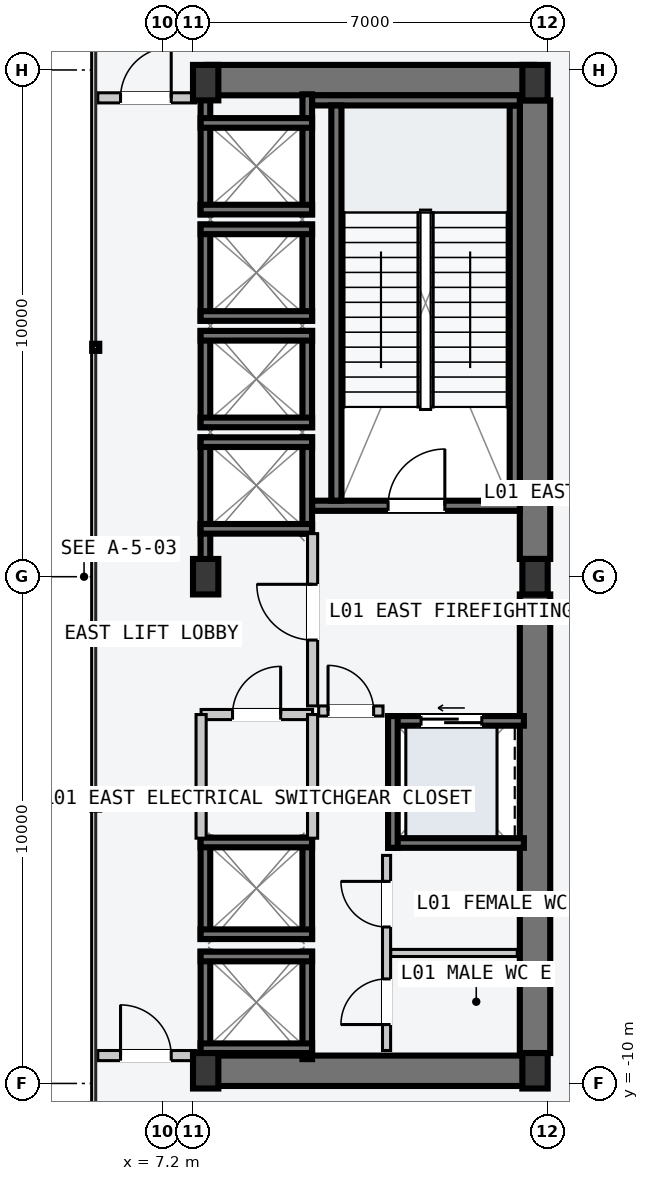
"""IFC4 building model, lengths in metres.
Left out: names, types, materials, properties, quantities, classifications, styles, units other than length and angle.
Written with IfcOpenShell. Run it as: python <this file> out.ifc"""

import sys

from ifc_helpers import new_model, si_unit, direction, frame, frame_2d, origin, origin_2d, place, context, subcontext, project, spatial, rectangle, i_section, extrude, element, fill, save


model = new_model("IFC4")
c1 = context("Model", 3, precision=1e-05, world=origin(), true_north=direction((0.0, 1.0)))
c2 = subcontext(c1, "Body", "Model", "MODEL_VIEW")
j1 = project(units=[si_unit("LENGTHUNIT", "METRE"), si_unit("PLANEANGLEUNIT", "RADIAN")], contexts=[c1])
p1 = place(None, origin())
s1 = spatial("IfcSite", under=j1, at=p1, CompositionType="ELEMENT")
p2 = place(p1, origin())
s2 = spatial("IfcBuilding", under=s1, at=p2, CompositionType="ELEMENT")
p3 = place(p2, frame((0.0, 0.0, 4.8)))
s3 = spatial("IfcBuildingStorey", under=s2, at=p3, CompositionType="ELEMENT", Elevation=4.8)
for number, where, z_axis, x_axis in (
    (1, (8.07, -9.75, -0.22), (0.0, 0.0, 1.0), (1.0, 0.0, 0.0)),
    (2, (8.07, 9.8, -0.22), (0.0, 0.0, 1.0), (1.0, 0.0, 0.0)),
):
    element("IfcWall", number, at=place(p3, frame(where, z_axis=z_axis, x_axis=x_axis)), inside=s3, PredefinedType="SHEAR", context=c2, shape_type="SweptSolid", body=[
        extrude(rectangle(XDim=6.46, YDim=0.6, at=frame_2d((3.23, 0.0))), origin(), (0.0, 0.0, 1.0), 4.8),
    ])
for number, where, z_axis, x_axis in (
    (3, (14.55, -9.4, -0.22), (0.0, 0.0, 1.0), (0.0, 1.0, 0.0)),
    (4, (14.55, 0.35, -0.22), (0.0, 0.0, 1.0), (0.0, 1.0, 0.0)),
):
    element("IfcWall", number, at=place(p3, frame(where, z_axis=z_axis, x_axis=x_axis)), inside=s3, PredefinedType="SHEAR", context=c2, shape_type="SweptSolid", body=[
        extrude(rectangle(XDim=9.05, YDim=0.6, at=frame_2d((4.525, 0.0))), origin(), (0.0, 0.0, 1.0), 4.8),
    ])
p4 = place(p3, frame((14.15, 1.5, -0.22), z_axis=(0.0, 0.0, 1.0), x_axis=(0.0, 1.0, 0.0)))
e5 = element("IfcWall", 5, at=p4, inside=s3, PredefinedType="SOLIDWALL", context=c2, shape_type="SweptSolid", body=[
    extrude(rectangle(XDim=7.8, YDim=0.2, at=frame_2d((3.9, 0.0))), origin(), (0.0, 0.0, 1.0), 4.8),
])
p5 = place(p3, frame((10.15, 1.4, -0.22), z_axis=(0.0, 0.0, 1.0), x_axis=(1.0, 0.0, 0.0)))
e6 = element("IfcWall", 6, at=p5, inside=s3, PredefinedType="SOLIDWALL", context=c2, shape_type="SweptSolid", body=[
    extrude(rectangle(XDim=4.1, YDim=0.2, at=frame_2d((2.05, 0.0))), origin(), (0.0, 0.0, 1.0), 4.8),
])
p6 = place(p5, frame((1.5, 0.0, 0.22)))
e7 = element("IfcOpeningElement", 7, at=p6, cuts=e6, PredefinedType="OPENING", context=c2, shape_type="SweptSolid", body=[
    extrude(rectangle(XDim=1.12, YDim=2.18, at=frame_2d((0.56, 1.09))), frame((0.0, 0.11, 0.0), z_axis=(0.0, -1.0, 0.0), x_axis=(1.0, 0.0, 0.0)), (0.0, 0.0, 1.0), 0.22),
])
p7 = place(p3, frame((10.15, 9.4, -0.22), z_axis=(0.0, 0.0, 1.0), x_axis=(1.0, 0.0, 0.0)))
e8 = element("IfcWall", 8, at=p7, inside=s3, PredefinedType="SOLIDWALL", context=c2, shape_type="SweptSolid", body=[
    extrude(rectangle(XDim=4.1, YDim=0.2, at=frame_2d((2.05, 0.0))), origin(), (0.0, 0.0, 1.0), 4.8),
])
p8 = place(p3, frame((10.63, 1.5, -0.22), z_axis=(0.0, 0.0, 1.0), x_axis=(0.0, 1.0, 0.0)))
e9 = element("IfcWall", 9, at=p8, inside=s3, PredefinedType="SOLIDWALL", context=c2, shape_type="SweptSolid", body=[
    extrude(rectangle(XDim=7.8, YDim=0.2, at=frame_2d((3.9, 0.0))), origin(), (0.0, 0.0, 1.0), 4.8),
])
for number, where, z_axis, x_axis in (
    (10, (8.05, -9.75, 0.0), (0.0, 0.0, 1.0), (1.0, 0.0, 0.0)),
    (11, (8.05, 0.0, 0.0), (0.0, 0.0, 1.0), (1.0, 0.0, 0.0)),
    (12, (8.05, 9.75, 0.0), (0.0, 0.0, 1.0), (1.0, 0.0, 0.0)),
    (13, (14.55, -9.75, 0.0), (0.0, 0.0, 1.0), (1.0, 0.0, 0.0)),
    (14, (14.55, 0.0, 0.0), (0.0, 0.0, 1.0), (1.0, 0.0, 0.0)),
    (15, (14.55, 9.75, 0.0), (0.0, 0.0, 1.0), (1.0, 0.0, 0.0)),
):
    element("IfcColumn", number, at=place(p3, frame(where, z_axis=z_axis, x_axis=x_axis)), inside=s3, PredefinedType="COLUMN", context=c2, shape_type="SweptSolid", body=[
        extrude(i_section(OverallWidth=0.5, OverallDepth=0.7, WebThickness=0.028, FlangeThickness=0.045, at=origin_2d()), origin(), (0.0, 0.0, 1.0), 4.8),
    ])
p9 = place(p3, frame((8.045, 0.21, -0.22), z_axis=(0.0, 0.0, 1.0), x_axis=(0.0, 1.0, 0.0)))
e16 = element("IfcWall", 16, at=p9, inside=s3, PredefinedType="SOLIDWALL", context=c2, shape_type="SweptSolid", body=[
    extrude(rectangle(XDim=2.54, YDim=0.19, at=frame_2d((1.27, 0.0))), origin(), (0.0, 0.0, 1.0), 4.8),
])
p10 = place(p3, frame((10.055, 0.85, -0.22), z_axis=(0.0, 0.0, 1.0), x_axis=(0.0, 1.0, 0.0)))
e17 = element("IfcWall", 17, at=p10, inside=s3, PredefinedType="SOLIDWALL", context=c2, shape_type="SweptSolid", body=[
    extrude(rectangle(XDim=1.9, YDim=0.19, at=frame_2d((0.95, 0.0))), origin(), (0.0, 0.0, 1.0), 4.8),
])
for number, where, z_axis, x_axis in (
    (18, (7.95, 2.655, -0.22), (0.0, 0.0, 1.0), (1.0, 0.0, 0.0)),
    (19, (7.95, 0.945, -0.22), (0.0, 0.0, 1.0), (1.0, 0.0, 0.0)),
):
    element("IfcWall", number, at=place(p3, frame(where, z_axis=z_axis, x_axis=x_axis)), inside=s3, PredefinedType="SOLIDWALL", context=c2, shape_type="SweptSolid", body=[
        extrude(rectangle(XDim=2.2, YDim=0.19, at=frame_2d((1.1, 0.0))), origin(), (0.0, 0.0, 1.0), 4.8),
    ])
for number, where, z_axis, x_axis in (
    (20, (8.045, 2.95, -0.22), (0.0, 0.0, 1.0), (0.0, 1.0, 0.0)),
    (21, (10.055, 2.95, -0.22), (0.0, 0.0, 1.0), (0.0, 1.0, 0.0)),
):
    element("IfcWall", number, at=place(p3, frame(where, z_axis=z_axis, x_axis=x_axis)), inside=s3, PredefinedType="SOLIDWALL", context=c2, shape_type="SweptSolid", body=[
        extrude(rectangle(XDim=1.9, YDim=0.19, at=frame_2d((0.95, 0.0))), origin(), (0.0, 0.0, 1.0), 4.8),
    ])
for number, where, z_axis, x_axis in (
    (22, (7.95, 4.755, -0.22), (0.0, 0.0, 1.0), (1.0, 0.0, 0.0)),
    (23, (7.95, 3.045, -0.22), (0.0, 0.0, 1.0), (1.0, 0.0, 0.0)),
):
    element("IfcWall", number, at=place(p3, frame(where, z_axis=z_axis, x_axis=x_axis)), inside=s3, PredefinedType="SOLIDWALL", context=c2, shape_type="SweptSolid", body=[
        extrude(rectangle(XDim=2.2, YDim=0.19, at=frame_2d((1.1, 0.0))), origin(), (0.0, 0.0, 1.0), 4.8),
    ])
for number, where, z_axis, x_axis in (
    (24, (8.045, 5.05, -0.22), (0.0, 0.0, 1.0), (0.0, 1.0, 0.0)),
    (25, (10.055, 5.05, -0.22), (0.0, 0.0, 1.0), (0.0, 1.0, 0.0)),
):
    element("IfcWall", number, at=place(p3, frame(where, z_axis=z_axis, x_axis=x_axis)), inside=s3, PredefinedType="SOLIDWALL", context=c2, shape_type="SweptSolid", body=[
        extrude(rectangle(XDim=1.9, YDim=0.19, at=frame_2d((0.95, 0.0))), origin(), (0.0, 0.0, 1.0), 4.8),
    ])
for number, where, z_axis, x_axis in (
    (26, (7.95, 6.855, -0.22), (0.0, 0.0, 1.0), (1.0, 0.0, 0.0)),
    (27, (7.95, 5.145, -0.22), (0.0, 0.0, 1.0), (1.0, 0.0, 0.0)),
):
    element("IfcWall", number, at=place(p3, frame(where, z_axis=z_axis, x_axis=x_axis)), inside=s3, PredefinedType="SOLIDWALL", context=c2, shape_type="SweptSolid", body=[
        extrude(rectangle(XDim=2.2, YDim=0.19, at=frame_2d((1.1, 0.0))), origin(), (0.0, 0.0, 1.0), 4.8),
    ])
for number, where, z_axis, x_axis in (
    (28, (8.045, 7.15, -0.22), (0.0, 0.0, 1.0), (0.0, 1.0, 0.0)),
    (29, (10.055, 7.15, -0.22), (0.0, 0.0, 1.0), (0.0, 1.0, 0.0)),
):
    element("IfcWall", number, at=place(p3, frame(where, z_axis=z_axis, x_axis=x_axis)), inside=s3, PredefinedType="SOLIDWALL", context=c2, shape_type="SweptSolid", body=[
        extrude(rectangle(XDim=2.37, YDim=0.19, at=frame_2d((1.185, 0.0))), origin(), (0.0, 0.0, 1.0), 4.8),
    ])
for number, where, z_axis, x_axis in (
    (30, (7.95, 8.955, -0.22), (0.0, 0.0, 1.0), (1.0, 0.0, 0.0)),
    (31, (7.95, 7.245, -0.22), (0.0, 0.0, 1.0), (1.0, 0.0, 0.0)),
):
    element("IfcWall", number, at=place(p3, frame(where, z_axis=z_axis, x_axis=x_axis)), inside=s3, PredefinedType="SOLIDWALL", context=c2, shape_type="SweptSolid", body=[
        extrude(rectangle(XDim=2.2, YDim=0.19, at=frame_2d((1.1, 0.0))), origin(), (0.0, 0.0, 1.0), 4.8),
    ])
for number, where, z_axis, x_axis in (
    (32, (8.045, -9.52, -0.22), (0.0, 0.0, 1.0), (0.0, 1.0, 0.0)),
    (33, (10.055, -9.52, -0.22), (0.0, 0.0, 1.0), (0.0, 1.0, 0.0)),
):
    element("IfcWall", number, at=place(p3, frame(where, z_axis=z_axis, x_axis=x_axis)), inside=s3, PredefinedType="SOLIDWALL", context=c2, shape_type="SweptSolid", body=[
        extrude(rectangle(XDim=2.12, YDim=0.19, at=frame_2d((1.06, 0.0))), origin(), (0.0, 0.0, 1.0), 4.8),
    ])
for number, where, z_axis, x_axis in (
    (34, (7.95, -7.495, -0.22), (0.0, 0.0, 1.0), (1.0, 0.0, 0.0)),
    (35, (7.95, -9.305, -0.22), (0.0, 0.0, 1.0), (1.0, 0.0, 0.0)),
):
    element("IfcWall", number, at=place(p3, frame(where, z_axis=z_axis, x_axis=x_axis)), inside=s3, PredefinedType="SOLIDWALL", context=c2, shape_type="SweptSolid", body=[
        extrude(rectangle(XDim=2.2, YDim=0.19, at=frame_2d((1.1, 0.0))), origin(), (0.0, 0.0, 1.0), 4.8),
    ])
for number, where, z_axis, x_axis in (
    (36, (8.045, -7.15, -0.22), (0.0, 0.0, 1.0), (0.0, 1.0, 0.0)),
    (37, (10.055, -7.15, -0.22), (0.0, 0.0, 1.0), (0.0, 1.0, 0.0)),
):
    element("IfcWall", number, at=place(p3, frame(where, z_axis=z_axis, x_axis=x_axis)), inside=s3, PredefinedType="SOLIDWALL", context=c2, shape_type="SweptSolid", body=[
        extrude(rectangle(XDim=2.0, YDim=0.19, at=frame_2d((1.0, 0.0))), origin(), (0.0, 0.0, 1.0), 4.8),
    ])
for number, where, z_axis, x_axis in (
    (38, (7.95, -5.245, -0.22), (0.0, 0.0, 1.0), (1.0, 0.0, 0.0)),
    (39, (7.95, -7.055, -0.22), (0.0, 0.0, 1.0), (1.0, 0.0, 0.0)),
):
    element("IfcWall", number, at=place(p3, frame(where, z_axis=z_axis, x_axis=x_axis)), inside=s3, PredefinedType="SOLIDWALL", context=c2, shape_type="SweptSolid", body=[
        extrude(rectangle(XDim=2.2, YDim=0.19, at=frame_2d((1.1, 0.0))), origin(), (0.0, 0.0, 1.0), 4.8),
    ])
p11 = place(p3, frame((11.65, -2.845, -0.22), z_axis=(0.0, 0.0, 1.0), x_axis=(1.0, 0.0, 0.0)))
e40 = element("IfcWall", 40, at=p11, inside=s3, PredefinedType="SOLIDWALL", context=c2, shape_type="SweptSolid", body=[
    extrude(rectangle(XDim=2.68, YDim=0.19, at=frame_2d((1.34, 0.0))), origin(), (0.0, 0.0, 1.0), 4.8),
])
p12 = place(p11, frame((0.65, 0.0, 0.22)))
e41 = element("IfcOpeningElement", 41, at=p12, cuts=e40, PredefinedType="OPENING", context=c2, shape_type="SweptSolid", body=[
    extrude(rectangle(XDim=1.2, YDim=2.2, at=frame_2d((0.6, 1.1))), frame((0.0, 0.105, 0.0), z_axis=(0.0, -1.0, 0.0), x_axis=(1.0, 0.0, 0.0)), (0.0, 0.0, 1.0), 0.21),
])
p13 = place(p3, frame((11.65, -5.255, -0.22), z_axis=(0.0, 0.0, 1.0), x_axis=(1.0, 0.0, 0.0)))
e42 = element("IfcWall", 42, at=p13, inside=s3, PredefinedType="SOLIDWALL", context=c2, shape_type="SweptSolid", body=[
    extrude(rectangle(XDim=2.68, YDim=0.19, at=frame_2d((1.34, 0.0))), origin(), (0.0, 0.0, 1.0), 4.8),
])
p14 = place(p3, frame((11.745, -5.35, -0.22), z_axis=(0.0, 0.0, 1.0), x_axis=(0.0, 1.0, 0.0)))
e43 = element("IfcWall", 43, at=p14, inside=s3, PredefinedType="SOLIDWALL", context=c2, shape_type="SweptSolid", body=[
    extrude(rectangle(XDim=2.6, YDim=0.19, at=frame_2d((1.3, 0.0))), origin(), (0.0, 0.0, 1.0), 4.8),
])
p15 = place(p3, frame((10.16, -2.55, 0.0), z_axis=(0.0, 0.0, 1.0), x_axis=(0.0, 1.0, 0.0)))
e44 = element("IfcWall", 44, at=p15, inside=s3, PredefinedType="PARTITIONING", context=c2, shape_type="SweptSolid", body=[
    extrude(rectangle(XDim=3.4, YDim=0.2, at=frame_2d((1.7, 0.0))), origin(), (0.0, 0.0, 1.0), 4.58),
])
p16 = place(p15, frame((1.3, 0.0, 0.0)))
e45 = element("IfcOpeningElement", 45, at=p16, cuts=e44, PredefinedType="OPENING", context=c2, shape_type="SweptSolid", body=[
    extrude(rectangle(XDim=1.1, YDim=2.15, at=frame_2d((0.55, 1.075))), frame((0.0, 0.11, 0.0), z_axis=(0.0, -1.0, 0.0), x_axis=(1.0, 0.0, 0.0)), (0.0, 0.0, 1.0), 0.22),
])
p17 = place(p3, frame((10.28, -2.65, 0.0), z_axis=(0.0, 0.0, 1.0), x_axis=(1.0, 0.0, 0.0)))
e46 = element("IfcWall", 46, at=p17, inside=s3, PredefinedType="PARTITIONING", context=c2, shape_type="SweptSolid", body=[
    extrude(rectangle(XDim=1.27, YDim=0.2, at=frame_2d((0.635, 0.0))), origin(), (0.0, 0.0, 1.0), 4.58),
])
p18 = place(p17, frame((0.185, 0.0, 0.0)))
e47 = element("IfcOpeningElement", 47, at=p18, cuts=e46, PredefinedType="OPENING", context=c2, shape_type="SweptSolid", body=[
    extrude(rectangle(XDim=0.9, YDim=2.15, at=frame_2d((0.45, 1.075))), frame((0.0, 0.11, 0.0), z_axis=(0.0, -1.0, 0.0), x_axis=(1.0, 0.0, 0.0)), (0.0, 0.0, 1.0), 0.22),
])
p19 = place(p3, frame((7.96, -2.72, 0.0), z_axis=(0.0, 0.0, 1.0), x_axis=(1.0, 0.0, 0.0)))
e48 = element("IfcWall", 48, at=p19, inside=s3, PredefinedType="PARTITIONING", context=c2, shape_type="SweptSolid", body=[
    extrude(rectangle(XDim=2.2, YDim=0.2, at=frame_2d((1.1, 0.0))), origin(), (0.0, 0.0, 1.0), 4.58),
])
p20 = place(p19, frame((0.62, 0.0, 0.0)))
e49 = element("IfcOpeningElement", 49, at=p20, cuts=e48, PredefinedType="OPENING", context=c2, shape_type="SweptSolid", body=[
    extrude(rectangle(XDim=0.95, YDim=2.1, at=frame_2d((0.475, 1.05))), frame((0.0, 0.11, 0.0), z_axis=(0.0, -1.0, 0.0), x_axis=(1.0, 0.0, 0.0)), (0.0, 0.0, 1.0), 0.22),
])
for number, where, z_axis, x_axis in (
    (50, (7.96, -5.16, 0.0), (0.0, 0.0, 1.0), (0.0, 1.0, 0.0)),
    (51, (10.16, -5.16, 0.0), (0.0, 0.0, 1.0), (0.0, 1.0, 0.0)),
):
    element("IfcWall", number, at=place(p3, frame(where, z_axis=z_axis, x_axis=x_axis)), inside=s3, PredefinedType="PARTITIONING", context=c2, shape_type="SweptSolid", body=[
        extrude(rectangle(XDim=2.44, YDim=0.2, at=frame_2d((1.22, 0.0))), origin(), (0.0, 0.0, 1.0), 4.58),
    ])
p21 = place(p3, frame((11.7, -7.425, 0.0), z_axis=(0.0, 0.0, 1.0), x_axis=(1.0, 0.0, 0.0)))
e52 = element("IfcWall", 52, at=p21, inside=s3, PredefinedType="PARTITIONING", context=c2, shape_type="SweptSolid", body=[
    extrude(rectangle(XDim=2.5, YDim=0.14, at=frame_2d((1.25, 0.0))), origin(), (0.0, 0.0, 1.0), 4.58),
])
p22 = place(p3, frame((11.62, -9.35, 0.0), z_axis=(0.0, 0.0, 1.0), x_axis=(0.0, 1.0, 0.0)))
e53 = element("IfcWall", 53, at=p22, inside=s3, PredefinedType="PARTITIONING", context=c2, shape_type="SweptSolid", body=[
    extrude(rectangle(XDim=3.85, YDim=0.16, at=frame_2d((1.925, 0.0))), origin(), (0.0, 0.0, 1.0), 4.58),
])
p23 = place(p22, frame((0.512, 0.0, 0.0)))
e54 = element("IfcOpeningElement", 54, at=p23, cuts=e53, PredefinedType="OPENING", context=c2, shape_type="SweptSolid", body=[
    extrude(rectangle(XDim=0.9, YDim=2.15, at=frame_2d((0.45, 1.075))), frame((0.0, 0.09, 0.0), z_axis=(0.0, -1.0, 0.0), x_axis=(1.0, 0.0, 0.0)), (0.0, 0.0, 1.0), 0.18),
])
p24 = place(p22, frame((2.438, 0.0, 0.0)))
e55 = element("IfcOpeningElement", 55, at=p24, cuts=e53, PredefinedType="OPENING", context=c2, shape_type="SweptSolid", body=[
    extrude(rectangle(XDim=0.9, YDim=2.15, at=frame_2d((0.45, 1.075))), frame((0.0, 0.09, 0.0), z_axis=(0.0, -1.0, 0.0), x_axis=(1.0, 0.0, 0.0)), (0.0, 0.0, 1.0), 0.18),
])
p25 = place(p3, frame((5.92, -9.45, 0.0), z_axis=(0.0, 0.0, 1.0), x_axis=(1.0, 0.0, 0.0)))
e56 = element("IfcWall", 56, at=p25, inside=s3, PredefinedType="PARTITIONING", context=c2, shape_type="SweptSolid", body=[
    extrude(rectangle(XDim=1.93, YDim=0.2, at=frame_2d((0.965, 0.0))), origin(), (0.0, 0.0, 1.0), 4.58),
])
p26 = place(p25, frame((0.45, 0.0, 0.0)))
e57 = element("IfcOpeningElement", 57, at=p26, cuts=e56, PredefinedType="OPENING", context=c2, shape_type="SweptSolid", body=[
    extrude(rectangle(XDim=1.0, YDim=2.15, at=frame_2d((0.5, 1.075))), frame((0.0, 0.11, 0.0), z_axis=(0.0, -1.0, 0.0), x_axis=(1.0, 0.0, 0.0)), (0.0, 0.0, 1.0), 0.22),
])
p27 = place(p3, frame((5.92, 9.45, 0.0), z_axis=(0.0, 0.0, 1.0), x_axis=(1.0, 0.0, 0.0)))
e58 = element("IfcWall", 58, at=p27, inside=s3, PredefinedType="PARTITIONING", context=c2, shape_type="SweptSolid", body=[
    extrude(rectangle(XDim=1.93, YDim=0.2, at=frame_2d((0.965, 0.0))), origin(), (0.0, 0.0, 1.0), 4.58),
])
p28 = place(p27, frame((0.45, 0.0, 0.0)))
e59 = element("IfcOpeningElement", 59, at=p28, cuts=e58, PredefinedType="OPENING", context=c2, shape_type="SweptSolid", body=[
    extrude(rectangle(XDim=1.0, YDim=2.15, at=frame_2d((0.5, 1.075))), frame((0.0, 0.11, 0.0), z_axis=(0.0, -1.0, 0.0), x_axis=(1.0, 0.0, 0.0)), (0.0, 0.0, 1.0), 0.22),
])
p29 = place(p6, origin())
e60 = element("IfcDoor", 60, at=p29, inside=s3, OperationType="SINGLE_SWING_RIGHT", PredefinedType="DOOR", context=c2, shape_type="SweptSolid", body=[
    extrude(rectangle(XDim=1.12, YDim=2.18, at=frame_2d((0.56, 1.09))), frame((0.0, 0.025, 0.0), z_axis=(0.0, -1.0, 0.0), x_axis=(1.0, 0.0, 0.0)), (0.0, 0.0, 1.0), 0.05),
])
fill(e7, e60)
p30 = place(p12, origin())
e61 = element("IfcDoor", 61, at=p30, inside=s3, OperationType="SLIDING_TO_LEFT", PredefinedType="DOOR", context=c2, shape_type="SweptSolid", body=[
    extrude(rectangle(XDim=1.2, YDim=2.2, at=frame_2d((0.6, 1.1))), frame((0.0, 0.025, 0.0), z_axis=(0.0, -1.0, 0.0), x_axis=(1.0, 0.0, 0.0)), (0.0, 0.0, 1.0), 0.05),
])
fill(e41, e61)
p31 = place(p16, origin())
e62 = element("IfcDoor", 62, at=p31, inside=s3, OperationType="SINGLE_SWING_RIGHT", PredefinedType="DOOR", context=c2, shape_type="SweptSolid", body=[
    extrude(rectangle(XDim=1.1, YDim=2.15, at=frame_2d((0.55, 1.075))), frame((0.0, 0.025, 0.0), z_axis=(0.0, -1.0, 0.0), x_axis=(1.0, 0.0, 0.0)), (0.0, 0.0, 1.0), 0.05),
])
fill(e45, e62)
p32 = place(p18, origin())
e63 = element("IfcDoor", 63, at=p32, inside=s3, OperationType="SINGLE_SWING_LEFT", PredefinedType="DOOR", context=c2, shape_type="SweptSolid", body=[
    extrude(rectangle(XDim=0.9, YDim=2.15, at=frame_2d((0.45, 1.075))), frame((0.0, 0.025, 0.0), z_axis=(0.0, -1.0, 0.0), x_axis=(1.0, 0.0, 0.0)), (0.0, 0.0, 1.0), 0.05),
])
fill(e47, e63)
p33 = place(p20, origin())
e64 = element("IfcDoor", 64, at=p33, inside=s3, OperationType="SINGLE_SWING_RIGHT", PredefinedType="DOOR", context=c2, shape_type="SweptSolid", body=[
    extrude(rectangle(XDim=0.95, YDim=2.1, at=frame_2d((0.475, 1.05))), frame((0.0, 0.025, 0.0), z_axis=(0.0, -1.0, 0.0), x_axis=(1.0, 0.0, 0.0)), (0.0, 0.0, 1.0), 0.05),
])
fill(e49, e64)
p34 = place(p23, origin())
e65 = element("IfcDoor", 65, at=p34, inside=s3, OperationType="SINGLE_SWING_LEFT", PredefinedType="DOOR", context=c2, shape_type="SweptSolid", body=[
    extrude(rectangle(XDim=0.9, YDim=2.15, at=frame_2d((0.45, 1.075))), frame((0.0, 0.025, 0.0), z_axis=(0.0, -1.0, 0.0), x_axis=(1.0, 0.0, 0.0)), (0.0, 0.0, 1.0), 0.05),
])
fill(e54, e65)
p35 = place(p24, origin())
e66 = element("IfcDoor", 66, at=p35, inside=s3, OperationType="SINGLE_SWING_RIGHT", PredefinedType="DOOR", context=c2, shape_type="SweptSolid", body=[
    extrude(rectangle(XDim=0.9, YDim=2.15, at=frame_2d((0.45, 1.075))), frame((0.0, 0.025, 0.0), z_axis=(0.0, -1.0, 0.0), x_axis=(1.0, 0.0, 0.0)), (0.0, 0.0, 1.0), 0.05),
])
fill(e55, e66)
p36 = place(p26, origin())
e67 = element("IfcDoor", 67, at=p36, inside=s3, OperationType="SINGLE_SWING_LEFT", PredefinedType="DOOR", context=c2, shape_type="SweptSolid", body=[
    extrude(rectangle(XDim=1.0, YDim=2.15, at=frame_2d((0.5, 1.075))), frame((0.0, 0.025, 0.0), z_axis=(0.0, -1.0, 0.0), x_axis=(1.0, 0.0, 0.0)), (0.0, 0.0, 1.0), 0.05),
])
fill(e57, e67)
p37 = place(p28, origin())
e68 = element("IfcDoor", 68, at=p37, inside=s3, OperationType="SINGLE_SWING_RIGHT", PredefinedType="DOOR", context=c2, shape_type="SweptSolid", body=[
    extrude(rectangle(XDim=1.0, YDim=2.15, at=frame_2d((0.5, 1.075))), frame((0.0, 0.025, 0.0), z_axis=(0.0, -1.0, 0.0), x_axis=(1.0, 0.0, 0.0)), (0.0, 0.0, 1.0), 0.05),
])
fill(e59, e68)
save(model, sys.argv[1])
